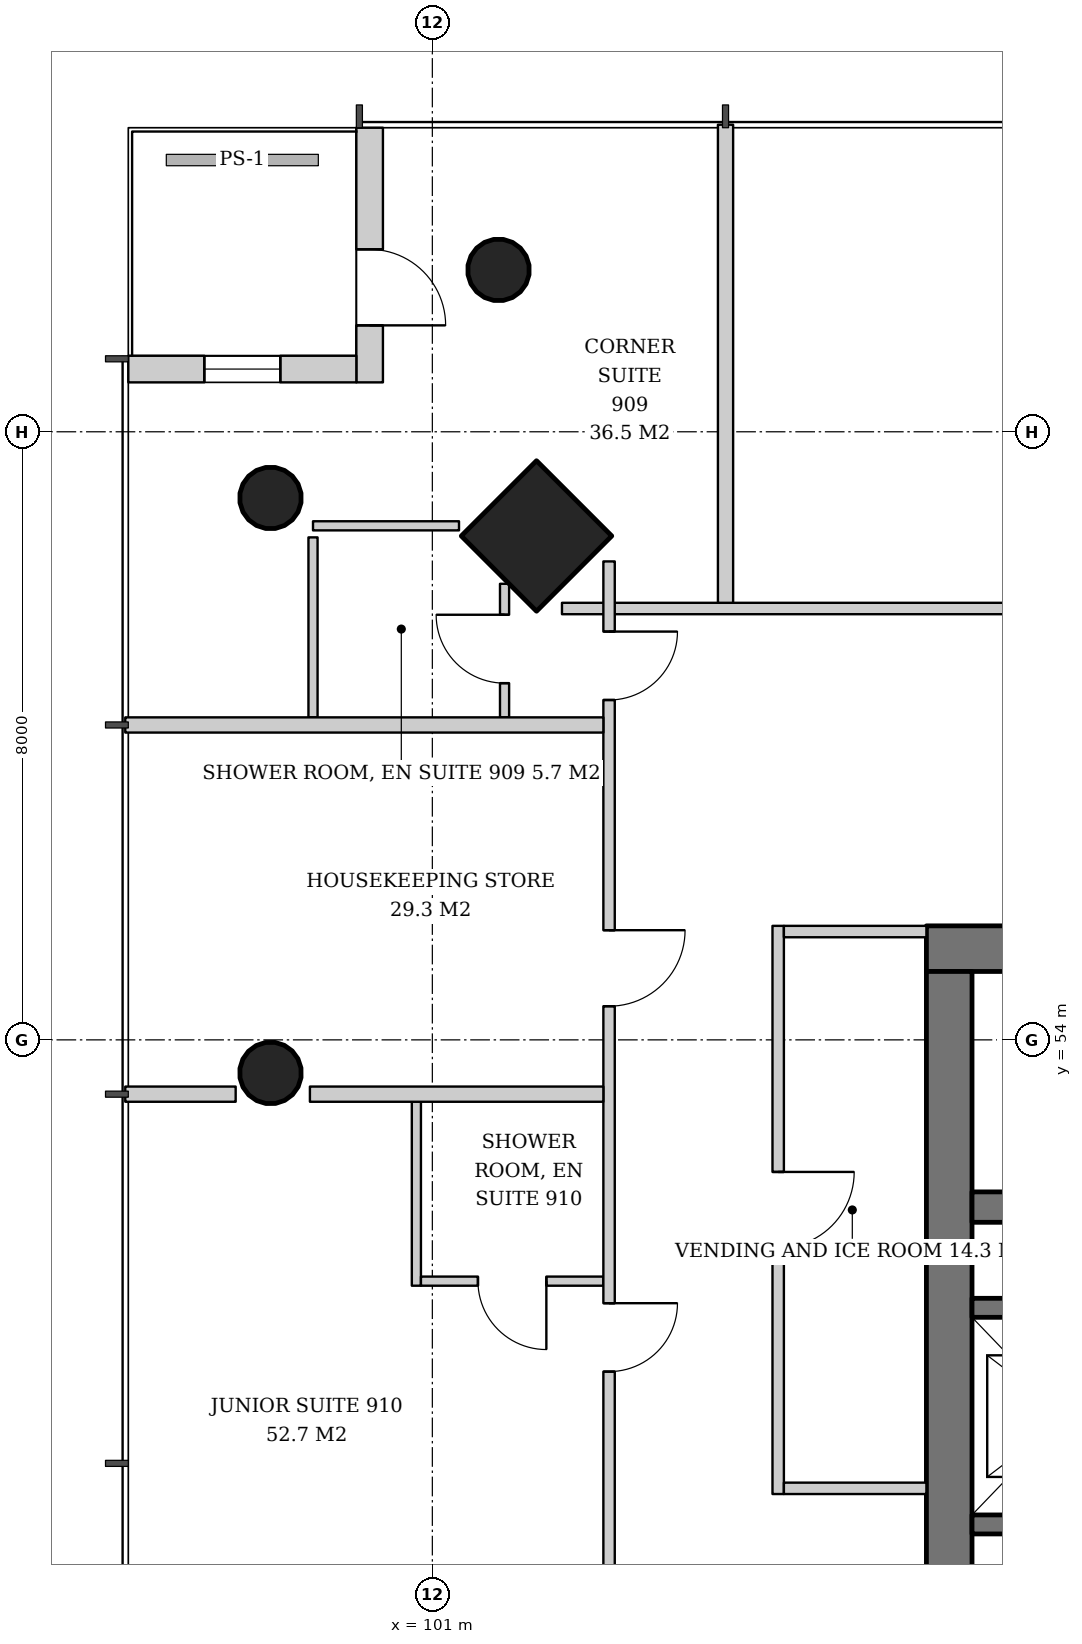
"""IFC4 building model, lengths in metres.
Left out: names, types, materials, properties, quantities, classifications, styles, units other than length and angle.
Written with IfcOpenShell. Run it as: python <this file> out.ifc"""

import sys

from ifc_helpers import new_model, si_unit, direction, frame, frame_2d, origin, origin_2d, place, context, subcontext, project, spatial, rectangle, hollow_circle, extrude, element, fill, save


model = new_model("IFC4")
c1 = context("Model", 3, precision=1e-05, world=origin(), true_north=direction((0.0, 1.0)))
c2 = subcontext(c1, "Body", "Model", "MODEL_VIEW")
j1 = project(units=[si_unit("LENGTHUNIT", "METRE"), si_unit("PLANEANGLEUNIT", "RADIAN")], contexts=[c1])
p1 = place(None, origin())
s1 = spatial("IfcSite", under=j1, at=p1, CompositionType="ELEMENT")
p2 = place(p1, origin())
s2 = spatial("IfcBuilding", under=s1, at=p2, CompositionType="ELEMENT")
p3 = place(p2, frame((0.0, 0.0, 40.0)))
s3 = spatial("IfcBuildingStorey", under=s2, at=p3, CompositionType="ELEMENT", Elevation=40.0)
p4 = place(p3, frame((102.319, 60.681, 0.0), z_axis=(0.043029647111, -0.043029647111, 0.998146732169), x_axis=(0.707106781187, 0.707106781187, 0.0)))
e1 = element("IfcColumn", 1, at=p4, inside=s3, PredefinedType="COLUMN", context=c2, shape_type="SweptSolid", body=[
    extrude(rectangle(XDim=1.4, YDim=1.4, at=origin_2d()), origin(), (0.0, 0.0, 1.0), 3.807),
])
for number, where, z_axis, x_axis in (
    (2, (101.819, 64.181, 0.0), (0.043, -0.043, 0.998), (0.707, 0.707, 0.0)),
    (3, (98.819, 61.181, 0.0), (0.043, -0.043, 0.998), (0.707, 0.707, 0.0)),
):
    element("IfcColumn", number, at=place(p3, frame(where, z_axis=z_axis, x_axis=x_axis)), inside=s3, PredefinedType="COLUMN", context=c2, shape_type="SweptSolid", body=[
        extrude(hollow_circle(Radius=0.406, WallThickness=0.03, at=origin_2d()), origin(), (0.0, 0.0, 1.0), 3.807),
    ])
p5 = place(p3, frame((98.819, 53.591, 0.0), z_axis=(0.043059525333, -0.021561848751, 0.998839808957), x_axis=(0.44774654769, 0.894160516368, 0.0)))
e4 = element("IfcColumn", 4, at=p5, inside=s3, PredefinedType="COLUMN", context=c2, shape_type="SweptSolid", body=[
    extrude(hollow_circle(Radius=0.406, WallThickness=0.03, at=origin_2d()), origin(), (0.0, 0.0, 1.0), 3.804),
])
p6 = place(p3, frame((107.5, 55.2, 0.0), z_axis=(0.0, 0.0, 1.0), x_axis=(1.0, 0.0, 0.0)))
e5 = element("IfcWall", 5, at=p6, inside=s3, PredefinedType="SHEAR", context=c2, shape_type="SweptSolid", body=[
    extrude(rectangle(XDim=19.0, YDim=0.6, at=frame_2d((9.5, 0.0))), origin(), (0.0, 0.0, 1.0), 3.8),
])
p7 = place(p6, frame((14.14, 0.0, 0.0)))
e6 = element("IfcOpeningElement", 6, at=p7, cuts=e5, PredefinedType="OPENING", context=c2, shape_type="SweptSolid", body=[
    extrude(rectangle(XDim=1.0, YDim=2.1, at=frame_2d((0.5, 1.05))), frame((0.0, 0.31, 0.0), z_axis=(0.0, -1.0, 0.0), x_axis=(1.0, 0.0, 0.0)), (0.0, 0.0, 1.0), 0.62),
])
p8 = place(p6, frame((1.675, 0.0, 0.0)))
e7 = element("IfcOpeningElement", 7, at=p8, cuts=e5, PredefinedType="OPENING", context=c2, shape_type="SweptSolid", body=[
    extrude(rectangle(XDim=1.0, YDim=2.1, at=frame_2d((0.5, 1.05))), frame((0.0, 0.31, 0.0), z_axis=(0.0, -1.0, 0.0), x_axis=(1.0, 0.0, 0.0)), (0.0, 0.0, 1.0), 0.62),
])
p9 = place(p6, frame((3.587, 0.0, 0.0)))
e8 = element("IfcOpeningElement", 8, at=p9, cuts=e5, PredefinedType="OPENING", context=c2, shape_type="SweptSolid", body=[
    extrude(rectangle(XDim=1.0, YDim=2.1, at=frame_2d((0.5, 1.05))), frame((0.0, 0.31, 0.0), z_axis=(0.0, -1.0, 0.0), x_axis=(1.0, 0.0, 0.0)), (0.0, 0.0, 1.0), 0.62),
])
p10 = place(p3, frame((107.8, 37.1, 0.0), z_axis=(0.0, 0.0, 1.0), x_axis=(0.0, 1.0, 0.0)))
e9 = element("IfcWall", 9, at=p10, inside=s3, PredefinedType="SHEAR", context=c2, shape_type="SweptSolid", body=[
    extrude(rectangle(XDim=17.8, YDim=0.6, at=frame_2d((8.9, 0.0))), origin(), (0.0, 0.0, 1.0), 3.8),
])
p11 = place(p10, frame((8.0, 0.0, 0.0)))
e10 = element("IfcOpeningElement", 10, at=p11, cuts=e9, PredefinedType="OPENING", context=c2, shape_type="SweptSolid", body=[
    extrude(rectangle(XDim=1.8, YDim=2.4, at=frame_2d((0.9, 1.2))), frame((0.0, 0.31, 0.0), z_axis=(0.0, -1.0, 0.0), x_axis=(1.0, 0.0, 0.0)), (0.0, 0.0, 1.0), 0.62),
])
p12 = place(p3, frame((108.1, 51.8, 0.0), z_axis=(0.0, 0.0, 1.0), x_axis=(1.0, 0.0, 0.0)))
e11 = element("IfcWall", 11, at=p12, inside=s3, PredefinedType="SHEAR", context=c2, shape_type="SweptSolid", body=[
    extrude(rectangle(XDim=17.8, YDim=0.4, at=frame_2d((8.9, 0.0))), origin(), (0.0, 0.0, 1.0), 3.8),
])
p13 = place(p3, frame((100.175, 66.0, 0.0), z_axis=(0.0, 0.0, 1.0), x_axis=(0.0, -1.0, 0.0)))
e12 = element("IfcWall", 12, at=p13, inside=s3, PredefinedType="SOLIDWALL", context=c2, shape_type="SweptSolid", body=[
    extrude(rectangle(XDim=3.35, YDim=0.35, at=frame_2d((1.675, 0.0))), origin(), (0.0, 0.0, 1.0), 3.6),
])
p14 = place(p13, frame((1.6, 0.0, 0.0)))
e13 = element("IfcOpeningElement", 13, at=p14, cuts=e12, PredefinedType="OPENING", context=c2, shape_type="SweptSolid", body=[
    extrude(rectangle(XDim=1.0, YDim=2.4, at=frame_2d((0.5, 1.2))), frame((0.0, 0.185, 0.0), z_axis=(0.0, -1.0, 0.0), x_axis=(1.0, 0.0, 0.0)), (0.0, 0.0, 1.0), 0.37),
])
p15 = place(p3, frame((100.0, 62.825, 0.0), z_axis=(0.0, 0.0, 1.0), x_axis=(-1.0, 0.0, 0.0)))
e14 = element("IfcWall", 14, at=p15, inside=s3, PredefinedType="SOLIDWALL", context=c2, shape_type="SweptSolid", body=[
    extrude(rectangle(XDim=3.0, YDim=0.35, at=frame_2d((1.5, 0.0))), origin(), (0.0, 0.0, 1.0), 3.6),
])
p16 = place(p15, frame((1.0, 0.0, 0.9)))
e15 = element("IfcOpeningElement", 15, at=p16, cuts=e14, PredefinedType="OPENING", context=c2, shape_type="SweptSolid", body=[
    extrude(rectangle(XDim=1.0, YDim=2.4, at=frame_2d((0.5, 1.2))), frame((0.0, 0.185, 0.0), z_axis=(0.0, -1.0, 0.0), x_axis=(1.0, 0.0, 0.0)), (0.0, 0.0, 1.0), 0.37),
])
p17 = place(p3, frame((108.1, 50.475, 0.0), z_axis=(0.0, 0.0, 1.0), x_axis=(1.0, 0.0, 0.0)))
e16 = element("IfcWall", 16, at=p17, inside=s3, PredefinedType="SHEAR", context=c2, shape_type="SweptSolid", body=[
    extrude(rectangle(XDim=11.0, YDim=0.25, at=frame_2d((5.5, 0.0))), origin(), (0.0, 0.0, 1.0), 3.8),
])
p18 = place(p3, frame((108.1, 47.625, 0.0), z_axis=(0.0, 0.0, 1.0), x_axis=(1.0, 0.0, 0.0)))
e17 = element("IfcWall", 17, at=p18, inside=s3, PredefinedType="SHEAR", context=c2, shape_type="SweptSolid", body=[
    extrude(rectangle(XDim=12.83, YDim=0.25, at=frame_2d((6.415, 0.0))), origin(), (0.0, 0.0, 1.0), 3.8),
])
p19 = place(p18, frame((0.7, 0.0, 0.0)))
e18 = element("IfcOpeningElement", 18, at=p19, cuts=e17, PredefinedType="OPENING", context=c2, shape_type="SweptSolid", body=[
    extrude(rectangle(XDim=1.1, YDim=2.2, at=frame_2d((0.55, 1.1))), frame((0.0, 0.135, 0.0), z_axis=(0.0, -1.0, 0.0), x_axis=(1.0, 0.0, 0.0)), (0.0, 0.0, 1.0), 0.27),
])
p20 = place(p18, frame((3.45, 0.0, 0.0)))
e19 = element("IfcOpeningElement", 19, at=p20, cuts=e17, PredefinedType="OPENING", context=c2, shape_type="SweptSolid", body=[
    extrude(rectangle(XDim=1.1, YDim=2.2, at=frame_2d((0.55, 1.1))), frame((0.0, 0.135, 0.0), z_axis=(0.0, -1.0, 0.0), x_axis=(1.0, 0.0, 0.0)), (0.0, 0.0, 1.0), 0.27),
])
p21 = place(p18, frame((6.2, 0.0, 0.0)))
e20 = element("IfcOpeningElement", 20, at=p21, cuts=e17, PredefinedType="OPENING", context=c2, shape_type="SweptSolid", body=[
    extrude(rectangle(XDim=1.1, YDim=2.2, at=frame_2d((0.55, 1.1))), frame((0.0, 0.135, 0.0), z_axis=(0.0, -1.0, 0.0), x_axis=(1.0, 0.0, 0.0)), (0.0, 0.0, 1.0), 0.27),
])
p22 = place(p18, frame((8.95, 0.0, 0.0)))
e21 = element("IfcOpeningElement", 21, at=p22, cuts=e17, PredefinedType="OPENING", context=c2, shape_type="SweptSolid", body=[
    extrude(rectangle(XDim=1.1, YDim=2.2, at=frame_2d((0.55, 1.1))), frame((0.0, 0.135, 0.0), z_axis=(0.0, -1.0, 0.0), x_axis=(1.0, 0.0, 0.0)), (0.0, 0.0, 1.0), 0.27),
])
p23 = place(p18, frame((11.515, 0.0, 0.0)))
e22 = element("IfcOpeningElement", 22, at=p23, cuts=e17, PredefinedType="OPENING", context=c2, shape_type="SweptSolid", body=[
    extrude(rectangle(XDim=0.8, YDim=2.0, at=frame_2d((0.4, 1.0))), frame((0.0, 0.135, 0.0), z_axis=(0.0, -1.0, 0.0), x_axis=(1.0, 0.0, 0.0)), (0.0, 0.0, 1.0), 0.27),
])
p24 = place(p3, frame((105.55, 55.5, 0.0), z_axis=(0.0, 0.0, 1.0), x_axis=(0.0, -1.0, 0.0)))
e23 = element("IfcWall", 23, at=p24, inside=s3, PredefinedType="PARTITIONING", context=c2, shape_type="SweptSolid", body=[
    extrude(rectangle(XDim=7.475, YDim=0.15, at=frame_2d((3.738, 0.0))), origin(), (0.0, 0.0, 1.0), 2.8),
])
p25 = place(p24, frame((3.238, 0.0, 0.0)))
e24 = element("IfcOpeningElement", 24, at=p25, cuts=e23, PredefinedType="OPENING", context=c2, shape_type="SweptSolid", body=[
    extrude(rectangle(XDim=1.0, YDim=2.1, at=frame_2d((0.5, 1.05))), frame((0.0, 0.085, 0.0), z_axis=(0.0, -1.0, 0.0), x_axis=(1.0, 0.0, 0.0)), (0.0, 0.0, 1.0), 0.17),
])
p26 = place(p3, frame((107.5, 55.425, 0.0), z_axis=(0.0, 0.0, 1.0), x_axis=(-1.0, 0.0, 0.0)))
e25 = element("IfcWall", 25, at=p26, inside=s3, PredefinedType="PARTITIONING", context=c2, shape_type="SweptSolid", body=[
    extrude(rectangle(XDim=1.875, YDim=0.15, at=frame_2d((0.938, 0.0))), origin(), (0.0, 0.0, 1.0), 2.8),
])
p27 = place(p3, frame((107.5, 48.1, 0.0), z_axis=(0.0, 0.0, 1.0), x_axis=(-1.0, 0.0, 0.0)))
e26 = element("IfcWall", 26, at=p27, inside=s3, PredefinedType="PARTITIONING", context=c2, shape_type="SweptSolid", body=[
    extrude(rectangle(XDim=1.875, YDim=0.15, at=frame_2d((0.938, 0.0))), origin(), (0.0, 0.0, 1.0), 3.6),
])
p28 = place(p3, frame((131.294, 59.675, 0.0), z_axis=(0.0, 0.0, 1.0), x_axis=(-1.0, 0.0, 0.0)))
e27 = element("IfcWall", 27, at=p28, inside=s3, PredefinedType="PARTITIONING", context=c2, shape_type="SweptSolid", body=[
    extrude(rectangle(XDim=28.589, YDim=0.15, at=frame_2d((14.294, 0.0))), origin(), (0.0, 0.0, 1.0), 2.8),
])
p29 = place(p28, frame((0.923, 0.0, 0.0)))
e28 = element("IfcOpeningElement", 28, at=p29, cuts=e27, PredefinedType="OPENING", context=c2, shape_type="SweptSolid", body=[
    extrude(rectangle(XDim=0.9, YDim=2.1, at=frame_2d((0.45, 1.05))), frame((0.0, 0.085, 0.0), z_axis=(0.0, -1.0, 0.0), x_axis=(1.0, 0.0, 0.0)), (0.0, 0.0, 1.0), 0.17),
])
p30 = place(p28, frame((4.902, 0.0, 0.0)))
e29 = element("IfcOpeningElement", 29, at=p30, cuts=e27, PredefinedType="OPENING", context=c2, shape_type="SweptSolid", body=[
    extrude(rectangle(XDim=0.9, YDim=2.1, at=frame_2d((0.45, 1.05))), frame((0.0, 0.085, 0.0), z_axis=(0.0, -1.0, 0.0), x_axis=(1.0, 0.0, 0.0)), (0.0, 0.0, 1.0), 0.17),
])
p31 = place(p28, frame((13.073, 0.0, 0.0)))
e30 = element("IfcOpeningElement", 30, at=p31, cuts=e27, PredefinedType="OPENING", context=c2, shape_type="SweptSolid", body=[
    extrude(rectangle(XDim=0.9, YDim=2.1, at=frame_2d((0.45, 1.05))), frame((0.0, 0.085, 0.0), z_axis=(0.0, -1.0, 0.0), x_axis=(1.0, 0.0, 0.0)), (0.0, 0.0, 1.0), 0.17),
])
p32 = place(p28, frame((19.423, 0.0, 0.0)))
e31 = element("IfcOpeningElement", 31, at=p32, cuts=e27, PredefinedType="OPENING", context=c2, shape_type="SweptSolid", body=[
    extrude(rectangle(XDim=1.0, YDim=2.1, at=frame_2d((0.5, 1.05))), frame((0.0, 0.085, 0.0), z_axis=(0.0, -1.0, 0.0), x_axis=(1.0, 0.0, 0.0)), (0.0, 0.0, 1.0), 0.17),
])
p33 = place(p3, frame((104.857, 59.75, 0.0), z_axis=(0.0, 0.0, 1.0), x_axis=(0.0, 1.0, 0.0)))
e32 = element("IfcWall", 32, at=p33, inside=s3, PredefinedType="PARTITIONING", context=c2, shape_type="SweptSolid", body=[
    extrude(rectangle(XDim=6.29, YDim=0.2, at=frame_2d((3.145, 0.0))), origin(), (0.0, 0.0, 1.0), 3.05),
])
p34 = place(p3, frame((101.95, 58.243, 0.0), z_axis=(0.0, 0.0, 1.0), x_axis=(0.0, 1.0, 0.0)))
e33 = element("IfcWall", 33, at=p34, inside=s3, PredefinedType="PARTITIONING", context=c2, shape_type="SweptSolid", body=[
    extrude(rectangle(XDim=1.757, YDim=0.12, at=frame_2d((0.878, 0.0))), origin(), (0.0, 0.0, 1.0), 3.6),
])
p35 = place(p34, frame((0.45, 0.0, 0.0)))
e34 = element("IfcOpeningElement", 34, at=p35, cuts=e33, PredefinedType="OPENING", context=c2, shape_type="SweptSolid", body=[
    extrude(rectangle(XDim=0.9, YDim=2.1, at=frame_2d((0.45, 1.05))), frame((0.0, 0.07, 0.0), z_axis=(0.0, -1.0, 0.0), x_axis=(1.0, 0.0, 0.0)), (0.0, 0.0, 1.0), 0.14),
])
p36 = place(p3, frame((99.43, 58.243, 0.0), z_axis=(0.0, 0.0, 1.0), x_axis=(0.0, 1.0, 0.0)))
e35 = element("IfcWall", 35, at=p36, inside=s3, PredefinedType="PARTITIONING", context=c2, shape_type="SweptSolid", body=[
    extrude(rectangle(XDim=2.368, YDim=0.12, at=frame_2d((1.184, 0.0))), origin(), (0.0, 0.0, 1.0), 3.6),
])
p37 = place(p3, frame((101.351, 60.763, 0.0), z_axis=(0.0, 0.0, 1.0), x_axis=(-1.0, 0.0, 0.0)))
e36 = element("IfcWall", 36, at=p37, inside=s3, PredefinedType="PARTITIONING", context=c2, shape_type="SweptSolid", body=[
    extrude(rectangle(XDim=1.921, YDim=0.12, at=frame_2d((0.96, 0.0))), origin(), (0.0, 0.0, 1.0), 3.2),
])
p38 = place(p3, frame((100.79, 53.186, 0.0), z_axis=(0.0, 0.0, 1.0), x_axis=(0.0, -1.0, 0.0)))
e37 = element("IfcWall", 37, at=p38, inside=s3, PredefinedType="PARTITIONING", context=c2, shape_type="SweptSolid", body=[
    extrude(rectangle(XDim=2.42, YDim=0.12, at=frame_2d((1.21, 0.0))), origin(), (0.0, 0.0, 1.0), 2.847),
])
p39 = place(p3, frame((103.25, 50.826, 0.0), z_axis=(0.0, 0.0, 1.0), x_axis=(-1.0, 0.0, 0.0)))
e38 = element("IfcWall", 38, at=p39, inside=s3, PredefinedType="PARTITIONING", context=c2, shape_type="SweptSolid", body=[
    extrude(rectangle(XDim=2.4, YDim=0.12, at=frame_2d((1.2, 0.0))), origin(), (0.0, 0.0, 1.0), 2.847),
])
p40 = place(p39, frame((0.75, 0.0, 0.0)))
e39 = element("IfcOpeningElement", 39, at=p40, cuts=e38, PredefinedType="OPENING", context=c2, shape_type="SweptSolid", body=[
    extrude(rectangle(XDim=0.9, YDim=2.1, at=frame_2d((0.45, 1.05))), frame((0.0, 0.07, 0.0), z_axis=(0.0, -1.0, 0.0), x_axis=(1.0, 0.0, 0.0)), (0.0, 0.0, 1.0), 0.14),
])
p41 = place(p3, frame((103.325, 60.294, 0.0), z_axis=(0.0, 0.0, 1.0), x_axis=(0.0, -1.0, 0.0)))
e40 = element("IfcWall", 40, at=p41, inside=s3, PredefinedType="PARTITIONING", context=c2, shape_type="SweptSolid", body=[
    extrude(rectangle(XDim=28.589, YDim=0.15, at=frame_2d((14.294, 0.0))), origin(), (0.0, 0.0, 1.0), 2.8),
])
p42 = place(p41, frame((0.923, 0.0, 0.0)))
e41 = element("IfcOpeningElement", 41, at=p42, cuts=e40, PredefinedType="OPENING", context=c2, shape_type="SweptSolid", body=[
    extrude(rectangle(XDim=0.9, YDim=2.1, at=frame_2d((0.45, 1.05))), frame((0.0, 0.085, 0.0), z_axis=(0.0, -1.0, 0.0), x_axis=(1.0, 0.0, 0.0)), (0.0, 0.0, 1.0), 0.17),
])
p43 = place(p41, frame((4.852, 0.0, 0.0)))
e42 = element("IfcOpeningElement", 42, at=p43, cuts=e40, PredefinedType="OPENING", context=c2, shape_type="SweptSolid", body=[
    extrude(rectangle(XDim=1.0, YDim=2.1, at=frame_2d((0.5, 1.05))), frame((0.0, 0.085, 0.0), z_axis=(0.0, -1.0, 0.0), x_axis=(1.0, 0.0, 0.0)), (0.0, 0.0, 1.0), 0.17),
])
p44 = place(p41, frame((9.759, 0.0, 0.0)))
e43 = element("IfcOpeningElement", 43, at=p44, cuts=e40, PredefinedType="OPENING", context=c2, shape_type="SweptSolid", body=[
    extrude(rectangle(XDim=0.9, YDim=2.1, at=frame_2d((0.45, 1.05))), frame((0.0, 0.085, 0.0), z_axis=(0.0, -1.0, 0.0), x_axis=(1.0, 0.0, 0.0)), (0.0, 0.0, 1.0), 0.17),
])
p45 = place(p41, frame((17.93, 0.0, 0.0)))
e44 = element("IfcOpeningElement", 44, at=p45, cuts=e40, PredefinedType="OPENING", context=c2, shape_type="SweptSolid", body=[
    extrude(rectangle(XDim=0.9, YDim=2.1, at=frame_2d((0.45, 1.05))), frame((0.0, 0.085, 0.0), z_axis=(0.0, -1.0, 0.0), x_axis=(1.0, 0.0, 0.0)), (0.0, 0.0, 1.0), 0.17),
])
p46 = place(p41, frame((24.33, 0.0, 0.0)))
e45 = element("IfcOpeningElement", 45, at=p46, cuts=e40, PredefinedType="OPENING", context=c2, shape_type="SweptSolid", body=[
    extrude(rectangle(XDim=0.9, YDim=2.1, at=frame_2d((0.45, 1.05))), frame((0.0, 0.085, 0.0), z_axis=(0.0, -1.0, 0.0), x_axis=(1.0, 0.0, 0.0)), (0.0, 0.0, 1.0), 0.17),
])
p47 = place(p3, frame((103.25, 58.143, 0.0), z_axis=(0.0, 0.0, 1.0), x_axis=(-1.0, 0.0, 0.0)))
e46 = element("IfcWall", 46, at=p47, inside=s3, PredefinedType="PARTITIONING", context=c2, shape_type="SweptSolid", body=[
    extrude(rectangle(XDim=6.29, YDim=0.2, at=frame_2d((3.145, 0.0))), origin(), (0.0, 0.0, 1.0), 3.05),
])
p48 = place(p3, frame((103.25, 53.286, 0.0), z_axis=(0.0, 0.0, 1.0), x_axis=(-1.0, 0.0, 0.0)))
e47 = element("IfcWall", 47, at=p48, inside=s3, PredefinedType="PARTITIONING", context=c2, shape_type="SweptSolid", body=[
    extrude(rectangle(XDim=3.861, YDim=0.2, at=frame_2d((1.93, 0.0))), origin(), (0.0, 0.0, 1.0), 3.6),
])
p49 = place(p3, frame((98.412, 53.286, 0.0), z_axis=(0.0, 0.0, 1.0), x_axis=(-1.0, 0.0, 0.0)))
e48 = element("IfcWall", 48, at=p49, inside=s3, PredefinedType="PARTITIONING", context=c2, shape_type="SweptSolid", body=[
    extrude(rectangle(XDim=1.452, YDim=0.2, at=frame_2d((0.726, 0.0))), origin(), (0.0, 0.0, 1.0), 3.6),
])
p50 = place(p14, origin())
e49 = element("IfcDoor", 49, at=p50, inside=s3, OperationType="SINGLE_SWING_RIGHT", PredefinedType="DOOR", context=c2, shape_type="SweptSolid", body=[
    extrude(rectangle(XDim=1.0, YDim=2.4, at=frame_2d((0.5, 1.2))), frame((0.0, 0.025, 0.0), z_axis=(0.0, -1.0, 0.0), x_axis=(1.0, 0.0, 0.0)), (0.0, 0.0, 1.0), 0.05),
])
fill(e13, e49)
p51 = place(p16, origin())
e50 = element("IfcWindow", 50, at=p51, inside=s3, PartitioningType="SINGLE_PANEL", PredefinedType="WINDOW", context=c2, shape_type="SweptSolid", body=[
    extrude(rectangle(XDim=1.0, YDim=2.4, at=frame_2d((0.5, 1.2))), frame((0.0, 0.03, 0.0), z_axis=(0.0, -1.0, 0.0), x_axis=(1.0, 0.0, 0.0)), (0.0, 0.0, 1.0), 0.06),
])
fill(e15, e50)
p52 = place(p25, origin())
e51 = element("IfcDoor", 51, at=p52, inside=s3, OperationType="SINGLE_SWING_LEFT", PredefinedType="DOOR", context=c2, shape_type="SweptSolid", body=[
    extrude(rectangle(XDim=1.0, YDim=2.1, at=frame_2d((0.5, 1.05))), frame((0.0, 0.025, 0.0), z_axis=(0.0, -1.0, 0.0), x_axis=(1.0, 0.0, 0.0)), (0.0, 0.0, 1.0), 0.05),
])
fill(e24, e51)
p53 = place(p35, origin())
e52 = element("IfcDoor", 52, at=p53, inside=s3, OperationType="SINGLE_SWING_RIGHT", PredefinedType="DOOR", context=c2, shape_type="SweptSolid", body=[
    extrude(rectangle(XDim=0.9, YDim=2.1, at=frame_2d((0.45, 1.05))), frame((0.0, 0.025, 0.0), z_axis=(0.0, -1.0, 0.0), x_axis=(1.0, 0.0, 0.0)), (0.0, 0.0, 1.0), 0.05),
])
fill(e34, e52)
p54 = place(p40, origin())
e53 = element("IfcDoor", 53, at=p54, inside=s3, OperationType="SINGLE_SWING_LEFT", PredefinedType="DOOR", context=c2, shape_type="SweptSolid", body=[
    extrude(rectangle(XDim=0.9, YDim=2.1, at=frame_2d((0.45, 1.05))), frame((0.0, 0.025, 0.0), z_axis=(0.0, -1.0, 0.0), x_axis=(1.0, 0.0, 0.0)), (0.0, 0.0, 1.0), 0.05),
])
fill(e39, e53)
p55 = place(p42, origin())
e54 = element("IfcDoor", 54, at=p55, inside=s3, OperationType="SINGLE_SWING_LEFT", PredefinedType="DOOR", context=c2, shape_type="SweptSolid", body=[
    extrude(rectangle(XDim=0.9, YDim=2.1, at=frame_2d((0.45, 1.05))), frame((0.0, 0.025, 0.0), z_axis=(0.0, -1.0, 0.0), x_axis=(1.0, 0.0, 0.0)), (0.0, 0.0, 1.0), 0.05),
])
fill(e41, e54)
p56 = place(p43, origin())
e55 = element("IfcDoor", 55, at=p56, inside=s3, OperationType="SINGLE_SWING_LEFT", PredefinedType="DOOR", context=c2, shape_type="SweptSolid", body=[
    extrude(rectangle(XDim=1.0, YDim=2.1, at=frame_2d((0.5, 1.05))), frame((0.0, 0.025, 0.0), z_axis=(0.0, -1.0, 0.0), x_axis=(1.0, 0.0, 0.0)), (0.0, 0.0, 1.0), 0.05),
])
fill(e42, e55)
p57 = place(p44, origin())
e56 = element("IfcDoor", 56, at=p57, inside=s3, OperationType="SINGLE_SWING_LEFT", PredefinedType="DOOR", context=c2, shape_type="SweptSolid", body=[
    extrude(rectangle(XDim=0.9, YDim=2.1, at=frame_2d((0.45, 1.05))), frame((0.0, 0.025, 0.0), z_axis=(0.0, -1.0, 0.0), x_axis=(1.0, 0.0, 0.0)), (0.0, 0.0, 1.0), 0.05),
])
fill(e43, e56)
save(model, sys.argv[1])
